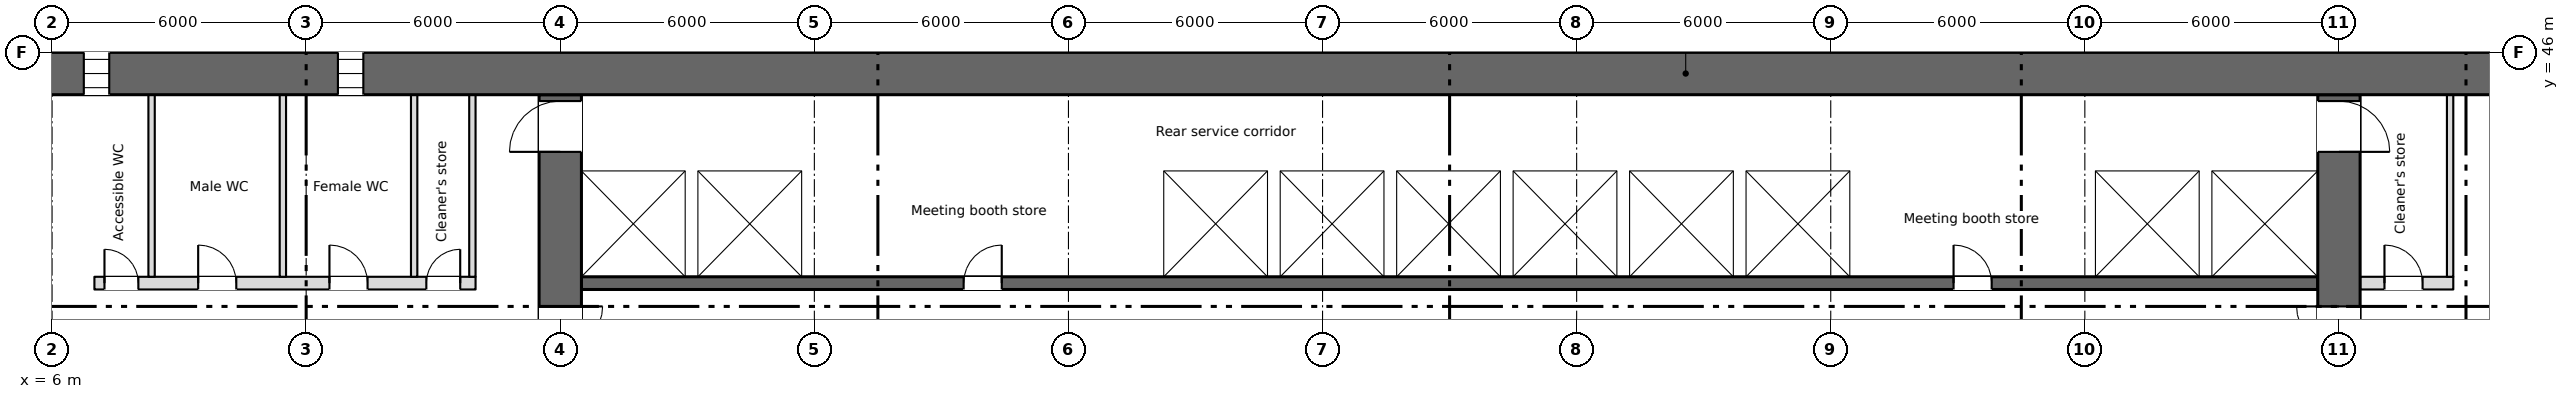
"""IFC4 building model, lengths in metres.
Left out: names, types, materials, properties, quantities, classifications, styles, units other than length and angle.
Written with IfcOpenShell. Run it as: python <this file> out.ifc"""

import sys

from ifc_helpers import new_model, si_unit, direction, frame, frame_2d, origin, place, context, subcontext, project, spatial, rectangle, extrude, element, fill, save


model = new_model("IFC4")
c1 = context("Model", 3, precision=1e-05, world=origin(), true_north=direction((0.0, 1.0)))
c2 = subcontext(c1, "Body", "Model", "MODEL_VIEW")
j1 = project(units=[si_unit("LENGTHUNIT", "METRE"), si_unit("PLANEANGLEUNIT", "RADIAN")], contexts=[c1])
p1 = place(None, origin())
s1 = spatial("IfcSite", under=j1, at=p1, CompositionType="ELEMENT")
p2 = place(p1, origin())
s2 = spatial("IfcBuilding", under=s1, at=p2, CompositionType="ELEMENT")
p3 = place(p2, frame((0.0, 0.0, 22.5)))
s3 = spatial("IfcBuildingStorey", under=s2, at=p3, CompositionType="ELEMENT", Elevation=22.5)
p4 = place(p3, frame((5.55, 45.5, 0.0), z_axis=(0.0, 0.0, 1.0), x_axis=(1.0, 0.0, 0.0)))
e1 = element("IfcWall", 1, at=p4, inside=s3, PredefinedType="SHEAR", context=c2, shape_type="SweptSolid", body=[
    extrude(rectangle(XDim=66.9, YDim=1.0, at=frame_2d((33.45, 0.0))), origin(), (0.0, 0.0, 1.0), 3.35),
])
p5 = place(p4, frame((1.2, 0.0, 0.6)))
e2 = element("IfcOpeningElement", 2, at=p5, cuts=e1, PredefinedType="OPENING", context=c2, shape_type="SweptSolid", body=[
    extrude(rectangle(XDim=0.6, YDim=2.4, at=frame_2d((0.3, 1.2))), frame((0.0, 0.51, 0.0), z_axis=(0.0, -1.0, 0.0), x_axis=(1.0, 0.0, 0.0)), (0.0, 0.0, 1.0), 1.02),
])
p6 = place(p4, frame((7.2, 0.0, 0.6)))
e3 = element("IfcOpeningElement", 3, at=p6, cuts=e1, PredefinedType="OPENING", context=c2, shape_type="SweptSolid", body=[
    extrude(rectangle(XDim=0.6, YDim=2.4, at=frame_2d((0.3, 1.2))), frame((0.0, 0.51, 0.0), z_axis=(0.0, -1.0, 0.0), x_axis=(1.0, 0.0, 0.0)), (0.0, 0.0, 1.0), 1.02),
])
p7 = place(p3, frame((6.85, 28.4, 0.0), z_axis=(0.0, 0.0, 1.0), x_axis=(0.0, 1.0, 0.0)))
e4 = element("IfcWall", 4, at=p7, inside=s3, PredefinedType="SHEAR", context=c2, shape_type="SweptSolid", body=[
    extrude(rectangle(XDim=16.6, YDim=0.3, at=frame_2d((8.3, 0.0))), origin(), (0.0, 0.0, 1.0), 3.35),
])
p8 = place(p3, frame((18.0, 28.4, 0.0), z_axis=(0.0, 0.0, 1.0), x_axis=(0.0, 1.0, 0.0)))
e5 = element("IfcWall", 5, at=p8, inside=s3, PredefinedType="SHEAR", context=c2, shape_type="SweptSolid", body=[
    extrude(rectangle(XDim=16.6, YDim=1.0, at=frame_2d((8.3, 0.0))), origin(), (0.0, 0.0, 1.0), 3.35),
])
p9 = place(p8, frame((9.6, 0.0, 0.0)))
e6 = element("IfcOpeningElement", 6, at=p9, cuts=e5, PredefinedType="OPENING", context=c2, shape_type="SweptSolid", body=[
    extrude(rectangle(XDim=2.0, YDim=2.1, at=frame_2d((1.0, 1.05))), frame((0.0, 0.51, 0.0), z_axis=(0.0, -1.0, 0.0), x_axis=(1.0, 0.0, 0.0)), (0.0, 0.0, 1.0), 1.02),
])
p10 = place(p8, frame((15.25, 0.0, 0.0)))
e7 = element("IfcOpeningElement", 7, at=p10, cuts=e5, PredefinedType="OPENING", context=c2, shape_type="SweptSolid", body=[
    extrude(rectangle(XDim=1.2, YDim=2.1, at=frame_2d((0.6, 1.05))), frame((0.0, 0.51, 0.0), z_axis=(0.0, -1.0, 0.0), x_axis=(1.0, 0.0, 0.0)), (0.0, 0.0, 1.0), 1.02),
])
p11 = place(p3, frame((60.0, 28.4, 0.0), z_axis=(0.0, 0.0, 1.0), x_axis=(0.0, 1.0, 0.0)))
e8 = element("IfcWall", 8, at=p11, inside=s3, PredefinedType="SHEAR", context=c2, shape_type="SweptSolid", body=[
    extrude(rectangle(XDim=16.6, YDim=1.0, at=frame_2d((8.3, 0.0))), origin(), (0.0, 0.0, 1.0), 3.35),
])
p12 = place(p11, frame((9.6, 0.0, 0.0)))
e9 = element("IfcOpeningElement", 9, at=p12, cuts=e8, PredefinedType="OPENING", context=c2, shape_type="SweptSolid", body=[
    extrude(rectangle(XDim=2.0, YDim=2.1, at=frame_2d((1.0, 1.05))), frame((0.0, 0.51, 0.0), z_axis=(0.0, -1.0, 0.0), x_axis=(1.0, 0.0, 0.0)), (0.0, 0.0, 1.0), 1.02),
])
p13 = place(p11, frame((15.25, 0.0, 0.0)))
e10 = element("IfcOpeningElement", 10, at=p13, cuts=e8, PredefinedType="OPENING", context=c2, shape_type="SweptSolid", body=[
    extrude(rectangle(XDim=1.2, YDim=2.1, at=frame_2d((0.6, 1.05))), frame((0.0, 0.51, 0.0), z_axis=(0.0, -1.0, 0.0), x_axis=(1.0, 0.0, 0.0)), (0.0, 0.0, 1.0), 1.02),
])
p14 = place(p3, frame((18.5, 40.55, 0.0), z_axis=(0.0, 0.0, 1.0), x_axis=(1.0, 0.0, 0.0)))
e11 = element("IfcWall", 11, at=p14, inside=s3, PredefinedType="SHEAR", context=c2, shape_type="SweptSolid", body=[
    extrude(rectangle(XDim=41.0, YDim=0.3, at=frame_2d((20.5, 0.0))), origin(), (0.0, 0.0, 1.0), 3.35),
])
p15 = place(p14, frame((9.025, 0.0, 0.0)))
e12 = element("IfcOpeningElement", 12, at=p15, cuts=e11, PredefinedType="OPENING", context=c2, shape_type="SweptSolid", body=[
    extrude(rectangle(XDim=0.9, YDim=2.1, at=frame_2d((0.45, 1.05))), frame((0.0, 0.16, 0.0), z_axis=(0.0, -1.0, 0.0), x_axis=(1.0, 0.0, 0.0)), (0.0, 0.0, 1.0), 0.32),
])
p16 = place(p14, frame((32.4, 0.0, 0.0)))
e13 = element("IfcOpeningElement", 13, at=p16, cuts=e11, PredefinedType="OPENING", context=c2, shape_type="SweptSolid", body=[
    extrude(rectangle(XDim=0.9, YDim=2.1, at=frame_2d((0.45, 1.05))), frame((0.0, 0.16, 0.0), z_axis=(0.0, -1.0, 0.0), x_axis=(1.0, 0.0, 0.0)), (0.0, 0.0, 1.0), 0.32),
])
p17 = place(p14, frame((14.425, 0.0, 0.0)))
e14 = element("IfcOpeningElement", 14, at=p17, cuts=e11, PredefinedType="OPENING", context=c2, shape_type="SweptSolid", body=[
    extrude(rectangle(XDim=1.1, YDim=2.1, at=frame_2d((0.55, 1.05))), frame((0.0, 0.16, 0.0), z_axis=(0.0, -1.0, 0.0), x_axis=(1.0, 0.0, 0.0)), (0.0, 0.0, 1.0), 0.32),
])
p18 = place(p14, frame((17.175, 0.0, 0.0)))
e15 = element("IfcOpeningElement", 15, at=p18, cuts=e11, PredefinedType="OPENING", context=c2, shape_type="SweptSolid", body=[
    extrude(rectangle(XDim=1.1, YDim=2.1, at=frame_2d((0.55, 1.05))), frame((0.0, 0.16, 0.0), z_axis=(0.0, -1.0, 0.0), x_axis=(1.0, 0.0, 0.0)), (0.0, 0.0, 1.0), 0.32),
])
p19 = place(p14, frame((19.925, 0.0, 0.0)))
e16 = element("IfcOpeningElement", 16, at=p19, cuts=e11, PredefinedType="OPENING", context=c2, shape_type="SweptSolid", body=[
    extrude(rectangle(XDim=1.1, YDim=2.1, at=frame_2d((0.55, 1.05))), frame((0.0, 0.16, 0.0), z_axis=(0.0, -1.0, 0.0), x_axis=(1.0, 0.0, 0.0)), (0.0, 0.0, 1.0), 0.32),
])
p20 = place(p14, frame((22.675, 0.0, 0.0)))
e17 = element("IfcOpeningElement", 17, at=p20, cuts=e11, PredefinedType="OPENING", context=c2, shape_type="SweptSolid", body=[
    extrude(rectangle(XDim=1.1, YDim=2.1, at=frame_2d((0.55, 1.05))), frame((0.0, 0.16, 0.0), z_axis=(0.0, -1.0, 0.0), x_axis=(1.0, 0.0, 0.0)), (0.0, 0.0, 1.0), 0.32),
])
p21 = place(p14, frame((36.375, 0.0, 0.0)))
e18 = element("IfcOpeningElement", 18, at=p21, cuts=e11, PredefinedType="OPENING", context=c2, shape_type="SweptSolid", body=[
    extrude(rectangle(XDim=1.2, YDim=2.1, at=frame_2d((0.6, 1.05))), frame((0.0, 0.16, 0.0), z_axis=(0.0, -1.0, 0.0), x_axis=(1.0, 0.0, 0.0)), (0.0, 0.0, 1.0), 0.32),
])
p22 = place(p14, frame((39.15, 0.0, 0.0)))
e19 = element("IfcOpeningElement", 19, at=p22, cuts=e11, PredefinedType="OPENING", context=c2, shape_type="SweptSolid", body=[
    extrude(rectangle(XDim=1.2, YDim=2.1, at=frame_2d((0.6, 1.05))), frame((0.0, 0.16, 0.0), z_axis=(0.0, -1.0, 0.0), x_axis=(1.0, 0.0, 0.0)), (0.0, 0.0, 1.0), 0.32),
])
p23 = place(p3, frame((18.5, 43.35, 0.0), z_axis=(0.0, 0.0, 1.0), x_axis=(1.0, 0.0, 0.0)))
e20 = element("IfcWall", 20, at=p23, inside=s3, PredefinedType="SHEAR", context=c2, shape_type="SweptSolid", body=[
    extrude(rectangle(XDim=41.0, YDim=0.3, at=frame_2d((20.5, 0.0))), origin(), (0.0, 0.0, 1.0), 3.35),
])
p24 = place(p3, frame((7.0, 40.55, 0.0), z_axis=(0.0, 0.0, 1.0), x_axis=(1.0, 0.0, 0.0)))
e21 = element("IfcWall", 21, at=p24, inside=s3, PredefinedType="PARTITIONING", context=c2, shape_type="SweptSolid", body=[
    extrude(rectangle(XDim=9.0, YDim=0.3, at=frame_2d((4.5, 0.0))), origin(), (0.0, 0.0, 1.0), 3.35),
])
p25 = place(p24, frame((0.238, 0.0, 0.0)))
e22 = element("IfcOpeningElement", 22, at=p25, cuts=e21, PredefinedType="OPENING", context=c2, shape_type="SweptSolid", body=[
    extrude(rectangle(XDim=0.8, YDim=2.1, at=frame_2d((0.4, 1.05))), frame((0.0, 0.16, 0.0), z_axis=(0.0, -1.0, 0.0), x_axis=(1.0, 0.0, 0.0)), (0.0, 0.0, 1.0), 0.32),
])
p26 = place(p24, frame((2.45, 0.0, 0.0)))
e23 = element("IfcOpeningElement", 23, at=p26, cuts=e21, PredefinedType="OPENING", context=c2, shape_type="SweptSolid", body=[
    extrude(rectangle(XDim=0.9, YDim=2.1, at=frame_2d((0.45, 1.05))), frame((0.0, 0.16, 0.0), z_axis=(0.0, -1.0, 0.0), x_axis=(1.0, 0.0, 0.0)), (0.0, 0.0, 1.0), 0.32),
])
p27 = place(p24, frame((5.55, 0.0, 0.0)))
e24 = element("IfcOpeningElement", 24, at=p27, cuts=e21, PredefinedType="OPENING", context=c2, shape_type="SweptSolid", body=[
    extrude(rectangle(XDim=0.9, YDim=2.1, at=frame_2d((0.45, 1.05))), frame((0.0, 0.16, 0.0), z_axis=(0.0, -1.0, 0.0), x_axis=(1.0, 0.0, 0.0)), (0.0, 0.0, 1.0), 0.32),
])
p28 = place(p24, frame((7.837, 0.0, 0.0)))
e25 = element("IfcOpeningElement", 25, at=p28, cuts=e21, PredefinedType="OPENING", context=c2, shape_type="SweptSolid", body=[
    extrude(rectangle(XDim=0.8, YDim=2.1, at=frame_2d((0.4, 1.05))), frame((0.0, 0.16, 0.0), z_axis=(0.0, -1.0, 0.0), x_axis=(1.0, 0.0, 0.0)), (0.0, 0.0, 1.0), 0.32),
])
p29 = place(p3, frame((60.5, 40.55, 0.0), z_axis=(0.0, 0.0, 1.0), x_axis=(1.0, 0.0, 0.0)))
e26 = element("IfcWall", 26, at=p29, inside=s3, PredefinedType="PARTITIONING", context=c2, shape_type="SweptSolid", body=[
    extrude(rectangle(XDim=2.2, YDim=0.3, at=frame_2d((1.1, 0.0))), origin(), (0.0, 0.0, 1.0), 3.35),
])
p30 = place(p29, frame((0.575, 0.0, 0.0)))
e27 = element("IfcOpeningElement", 27, at=p30, cuts=e26, PredefinedType="OPENING", context=c2, shape_type="SweptSolid", body=[
    extrude(rectangle(XDim=0.9, YDim=2.1, at=frame_2d((0.45, 1.05))), frame((0.0, 0.16, 0.0), z_axis=(0.0, -1.0, 0.0), x_axis=(1.0, 0.0, 0.0)), (0.0, 0.0, 1.0), 0.32),
])
for number, where, z_axis, x_axis in (
    (28, (21.1, 40.7, 0.0), (0.0, 0.0, 1.0), (0.0, 1.0, 0.0)),
    (29, (23.85, 40.7, 0.0), (0.0, 0.0, 1.0), (0.0, 1.0, 0.0)),
    (30, (32.1, 40.7, 0.0), (0.0, 0.0, 1.0), (0.0, 1.0, 0.0)),
    (31, (34.85, 40.7, 0.0), (0.0, 0.0, 1.0), (0.0, 1.0, 0.0)),
    (32, (37.6, 40.7, 0.0), (0.0, 0.0, 1.0), (0.0, 1.0, 0.0)),
    (33, (40.35, 40.7, 0.0), (0.0, 0.0, 1.0), (0.0, 1.0, 0.0)),
    (34, (43.1, 40.7, 0.0), (0.0, 0.0, 1.0), (0.0, 1.0, 0.0)),
    (35, (45.85, 40.7, 0.0), (0.0, 0.0, 1.0), (0.0, 1.0, 0.0)),
    (36, (48.6, 40.7, 0.0), (0.0, 0.0, 1.0), (0.0, 1.0, 0.0)),
    (37, (54.1, 40.7, 0.0), (0.0, 0.0, 1.0), (0.0, 1.0, 0.0)),
    (38, (56.85, 40.7, 0.0), (0.0, 0.0, 1.0), (0.0, 1.0, 0.0)),
):
    element("IfcWall", number, at=place(p3, frame(where, z_axis=z_axis, x_axis=x_axis)), inside=s3, PredefinedType="SHEAR", context=c2, shape_type="SweptSolid", body=[
        extrude(rectangle(XDim=2.5, YDim=0.3, at=frame_2d((1.25, 0.0))), origin(), (0.0, 0.0, 1.0), 3.35),
    ])
for number, where, z_axis, x_axis in (
    (39, (15.925, 40.7, 0.0), (0.0, 0.0, 1.0), (0.0, 1.0, 0.0)),
    (40, (62.625, 40.7, 0.0), (0.0, 0.0, 1.0), (0.0, 1.0, 0.0)),
    (41, (8.35, 40.7, 0.0), (0.0, 0.0, 1.0), (0.0, 1.0, 0.0)),
    (42, (11.45, 40.7, 0.0), (0.0, 0.0, 1.0), (0.0, 1.0, 0.0)),
    (43, (14.55, 40.7, 0.0), (0.0, 0.0, 1.0), (0.0, 1.0, 0.0)),
):
    element("IfcWall", number, at=place(p3, frame(where, z_axis=z_axis, x_axis=x_axis)), inside=s3, PredefinedType="PARTITIONING", context=c2, shape_type="SweptSolid", body=[
        extrude(rectangle(XDim=4.3, YDim=0.15, at=frame_2d((2.15, 0.0))), origin(), (0.0, 0.0, 1.0), 3.35),
    ])
p31 = place(p5, origin())
e44 = element("IfcWindow", 44, at=p31, inside=s3, PartitioningType="SINGLE_PANEL", PredefinedType="WINDOW", context=c2, shape_type="SweptSolid", body=[
    extrude(rectangle(XDim=0.6, YDim=2.4, at=frame_2d((0.3, 1.2))), frame((0.0, 0.03, 0.0), z_axis=(0.0, -1.0, 0.0), x_axis=(1.0, 0.0, 0.0)), (0.0, 0.0, 1.0), 0.06),
])
fill(e2, e44)
p32 = place(p6, origin())
e45 = element("IfcWindow", 45, at=p32, inside=s3, PartitioningType="SINGLE_PANEL", PredefinedType="WINDOW", context=c2, shape_type="SweptSolid", body=[
    extrude(rectangle(XDim=0.6, YDim=2.4, at=frame_2d((0.3, 1.2))), frame((0.0, 0.03, 0.0), z_axis=(0.0, -1.0, 0.0), x_axis=(1.0, 0.0, 0.0)), (0.0, 0.0, 1.0), 0.06),
])
fill(e3, e45)
p33 = place(p25, origin())
e46 = element("IfcDoor", 46, at=p33, inside=s3, OperationType="SINGLE_SWING_LEFT", PredefinedType="DOOR", context=c2, shape_type="SweptSolid", body=[
    extrude(rectangle(XDim=0.8, YDim=2.1, at=frame_2d((0.4, 1.05))), frame((0.0, 0.025, 0.0), z_axis=(0.0, -1.0, 0.0), x_axis=(1.0, 0.0, 0.0)), (0.0, 0.0, 1.0), 0.05),
])
fill(e22, e46)
p34 = place(p26, origin())
e47 = element("IfcDoor", 47, at=p34, inside=s3, OperationType="SINGLE_SWING_LEFT", PredefinedType="DOOR", context=c2, shape_type="SweptSolid", body=[
    extrude(rectangle(XDim=0.9, YDim=2.1, at=frame_2d((0.45, 1.05))), frame((0.0, 0.025, 0.0), z_axis=(0.0, -1.0, 0.0), x_axis=(1.0, 0.0, 0.0)), (0.0, 0.0, 1.0), 0.05),
])
fill(e23, e47)
p35 = place(p27, origin())
e48 = element("IfcDoor", 48, at=p35, inside=s3, OperationType="SINGLE_SWING_LEFT", PredefinedType="DOOR", context=c2, shape_type="SweptSolid", body=[
    extrude(rectangle(XDim=0.9, YDim=2.1, at=frame_2d((0.45, 1.05))), frame((0.0, 0.025, 0.0), z_axis=(0.0, -1.0, 0.0), x_axis=(1.0, 0.0, 0.0)), (0.0, 0.0, 1.0), 0.05),
])
fill(e24, e48)
p36 = place(p28, origin())
e49 = element("IfcDoor", 49, at=p36, inside=s3, OperationType="SINGLE_SWING_RIGHT", PredefinedType="DOOR", context=c2, shape_type="SweptSolid", body=[
    extrude(rectangle(XDim=0.8, YDim=2.1, at=frame_2d((0.4, 1.05))), frame((0.0, 0.025, 0.0), z_axis=(0.0, -1.0, 0.0), x_axis=(1.0, 0.0, 0.0)), (0.0, 0.0, 1.0), 0.05),
])
fill(e25, e49)
p37 = place(p30, origin())
e50 = element("IfcDoor", 50, at=p37, inside=s3, OperationType="SINGLE_SWING_LEFT", PredefinedType="DOOR", context=c2, shape_type="SweptSolid", body=[
    extrude(rectangle(XDim=0.9, YDim=2.1, at=frame_2d((0.45, 1.05))), frame((0.0, 0.025, 0.0), z_axis=(0.0, -1.0, 0.0), x_axis=(1.0, 0.0, 0.0)), (0.0, 0.0, 1.0), 0.05),
])
fill(e27, e50)
p38 = place(p15, origin())
e51 = element("IfcDoor", 51, at=p38, inside=s3, OperationType="SINGLE_SWING_RIGHT", PredefinedType="DOOR", context=c2, shape_type="SweptSolid", body=[
    extrude(rectangle(XDim=0.9, YDim=2.1, at=frame_2d((0.45, 1.05))), frame((0.0, 0.025, 0.0), z_axis=(0.0, -1.0, 0.0), x_axis=(1.0, 0.0, 0.0)), (0.0, 0.0, 1.0), 0.05),
])
fill(e12, e51)
p39 = place(p16, origin())
e52 = element("IfcDoor", 52, at=p39, inside=s3, OperationType="SINGLE_SWING_LEFT", PredefinedType="DOOR", context=c2, shape_type="SweptSolid", body=[
    extrude(rectangle(XDim=0.9, YDim=2.1, at=frame_2d((0.45, 1.05))), frame((0.0, 0.025, 0.0), z_axis=(0.0, -1.0, 0.0), x_axis=(1.0, 0.0, 0.0)), (0.0, 0.0, 1.0), 0.05),
])
fill(e13, e52)
p40 = place(p17, origin())
e53 = element("IfcDoor", 53, at=p40, inside=s3, OperationType="SLIDING_TO_LEFT", PredefinedType="DOOR", context=c2, shape_type="SweptSolid", body=[
    extrude(rectangle(XDim=1.1, YDim=2.1, at=frame_2d((0.55, 1.05))), frame((0.0, 0.025, 0.0), z_axis=(0.0, -1.0, 0.0), x_axis=(1.0, 0.0, 0.0)), (0.0, 0.0, 1.0), 0.05),
])
fill(e14, e53)
p41 = place(p18, origin())
e54 = element("IfcDoor", 54, at=p41, inside=s3, OperationType="SLIDING_TO_LEFT", PredefinedType="DOOR", context=c2, shape_type="SweptSolid", body=[
    extrude(rectangle(XDim=1.1, YDim=2.1, at=frame_2d((0.55, 1.05))), frame((0.0, 0.025, 0.0), z_axis=(0.0, -1.0, 0.0), x_axis=(1.0, 0.0, 0.0)), (0.0, 0.0, 1.0), 0.05),
])
fill(e15, e54)
p42 = place(p19, origin())
e55 = element("IfcDoor", 55, at=p42, inside=s3, OperationType="SLIDING_TO_LEFT", PredefinedType="DOOR", context=c2, shape_type="SweptSolid", body=[
    extrude(rectangle(XDim=1.1, YDim=2.1, at=frame_2d((0.55, 1.05))), frame((0.0, 0.025, 0.0), z_axis=(0.0, -1.0, 0.0), x_axis=(1.0, 0.0, 0.0)), (0.0, 0.0, 1.0), 0.05),
])
fill(e16, e55)
p43 = place(p20, origin())
e56 = element("IfcDoor", 56, at=p43, inside=s3, OperationType="SLIDING_TO_LEFT", PredefinedType="DOOR", context=c2, shape_type="SweptSolid", body=[
    extrude(rectangle(XDim=1.1, YDim=2.1, at=frame_2d((0.55, 1.05))), frame((0.0, 0.025, 0.0), z_axis=(0.0, -1.0, 0.0), x_axis=(1.0, 0.0, 0.0)), (0.0, 0.0, 1.0), 0.05),
])
fill(e17, e56)
p44 = place(p21, origin())
e57 = element("IfcDoor", 57, at=p44, inside=s3, OperationType="SLIDING_TO_LEFT", PredefinedType="DOOR", context=c2, shape_type="SweptSolid", body=[
    extrude(rectangle(XDim=1.2, YDim=2.1, at=frame_2d((0.6, 1.05))), frame((0.0, 0.025, 0.0), z_axis=(0.0, -1.0, 0.0), x_axis=(1.0, 0.0, 0.0)), (0.0, 0.0, 1.0), 0.05),
])
fill(e18, e57)
p45 = place(p22, origin())
e58 = element("IfcDoor", 58, at=p45, inside=s3, OperationType="SLIDING_TO_LEFT", PredefinedType="DOOR", context=c2, shape_type="SweptSolid", body=[
    extrude(rectangle(XDim=1.2, YDim=2.1, at=frame_2d((0.6, 1.05))), frame((0.0, 0.025, 0.0), z_axis=(0.0, -1.0, 0.0), x_axis=(1.0, 0.0, 0.0)), (0.0, 0.0, 1.0), 0.05),
])
fill(e19, e58)
p46 = place(p9, origin())
e59 = element("IfcDoor", 59, at=p46, inside=s3, OperationType="DOUBLE_DOOR_SINGLE_SWING", PredefinedType="DOOR", context=c2, shape_type="SweptSolid", body=[
    extrude(rectangle(XDim=2.0, YDim=2.1, at=frame_2d((1.0, 1.05))), frame((0.0, 0.025, 0.0), z_axis=(0.0, -1.0, 0.0), x_axis=(1.0, 0.0, 0.0)), (0.0, 0.0, 1.0), 0.05),
])
fill(e6, e59)
p47 = place(p12, origin())
e60 = element("IfcDoor", 60, at=p47, inside=s3, OperationType="DOUBLE_DOOR_SINGLE_SWING", PredefinedType="DOOR", context=c2, shape_type="SweptSolid", body=[
    extrude(rectangle(XDim=2.0, YDim=2.1, at=frame_2d((1.0, 1.05))), frame((0.0, 0.025, 0.0), z_axis=(0.0, -1.0, 0.0), x_axis=(1.0, 0.0, 0.0)), (0.0, 0.0, 1.0), 0.05),
])
fill(e9, e60)
p48 = place(p10, origin())
e61 = element("IfcDoor", 61, at=p48, inside=s3, OperationType="SINGLE_SWING_LEFT", PredefinedType="DOOR", context=c2, shape_type="SweptSolid", body=[
    extrude(rectangle(XDim=1.2, YDim=2.1, at=frame_2d((0.6, 1.05))), frame((0.0, 0.025, 0.0), z_axis=(0.0, -1.0, 0.0), x_axis=(1.0, 0.0, 0.0)), (0.0, 0.0, 1.0), 0.05),
])
fill(e7, e61)
p49 = place(p13, origin())
e62 = element("IfcDoor", 62, at=p49, inside=s3, OperationType="SINGLE_SWING_LEFT", PredefinedType="DOOR", context=c2, shape_type="SweptSolid", body=[
    extrude(rectangle(XDim=1.2, YDim=2.1, at=frame_2d((0.6, 1.05))), frame((0.0, 0.025, 0.0), z_axis=(0.0, -1.0, 0.0), x_axis=(1.0, 0.0, 0.0)), (0.0, 0.0, 1.0), 0.05),
])
fill(e10, e62)
save(model, sys.argv[1])
